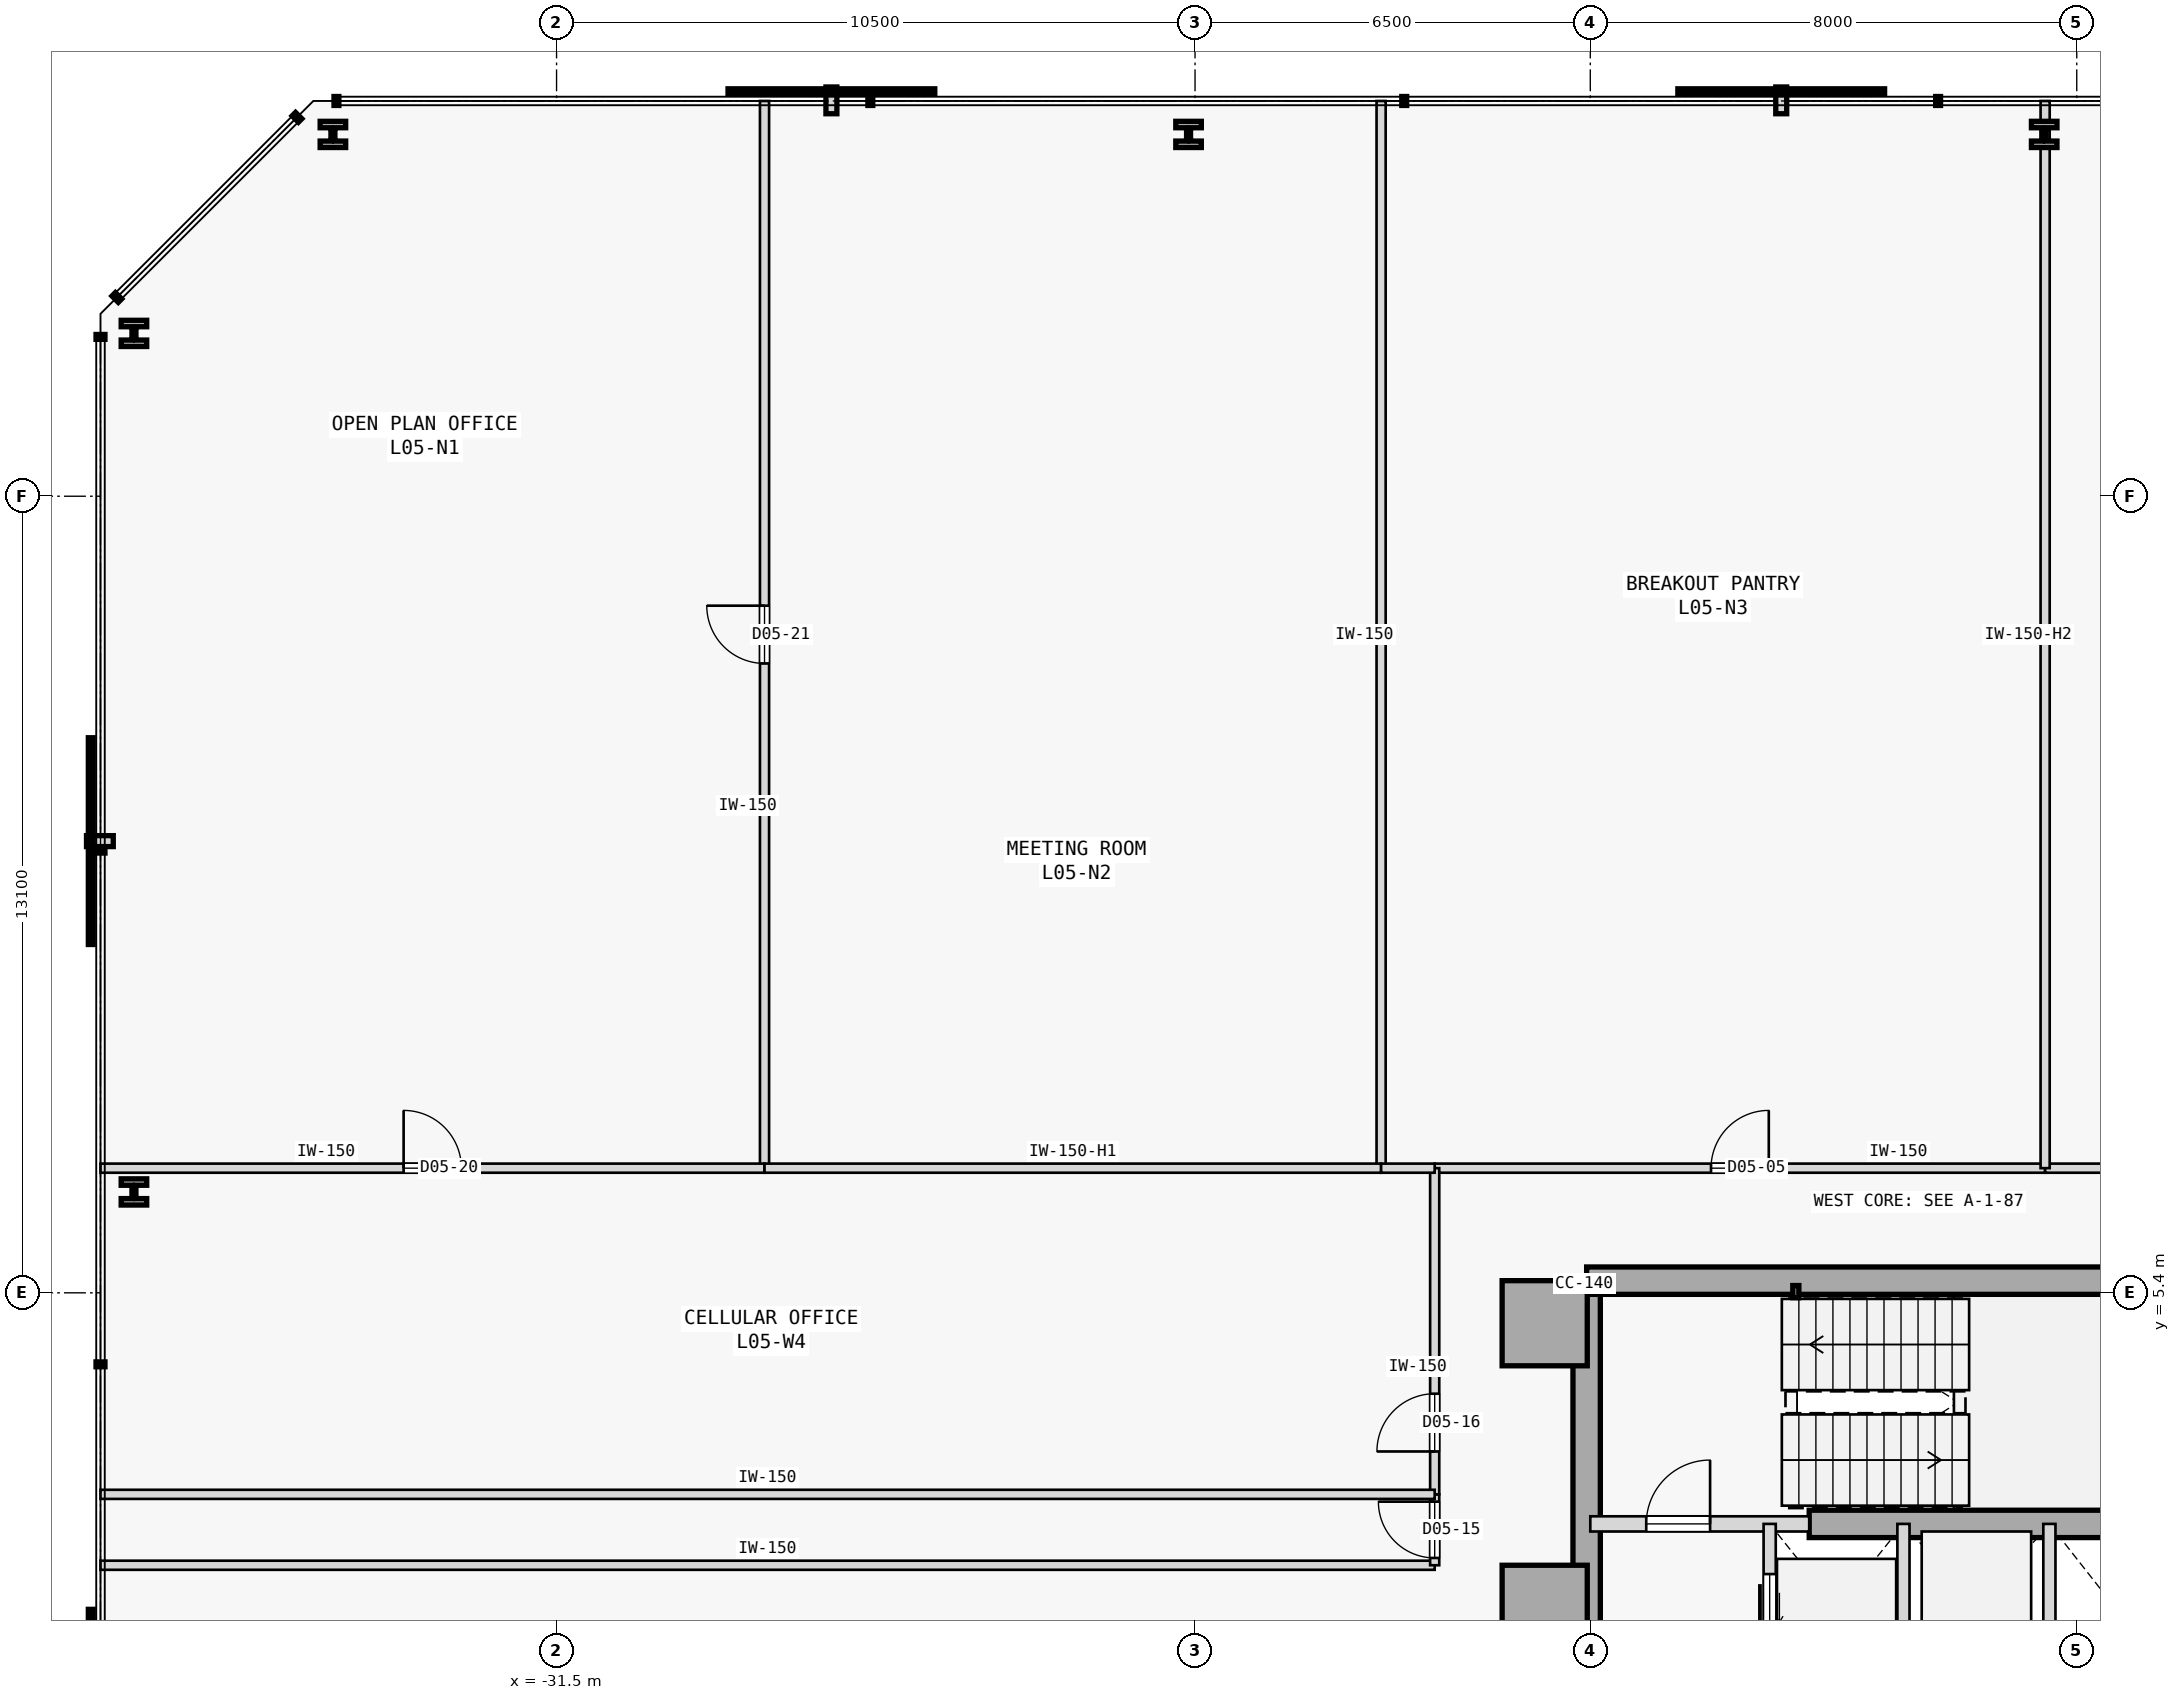
"""IFC4 building model, lengths in metres.
Left out: names, types, materials, properties, quantities, classifications, styles, units other than length and angle.
Written with IfcOpenShell. Run it as: python <this file> out.ifc"""

import sys

from ifc_helpers import new_model, si_unit, direction, frame, frame_2d, origin, origin_2d, place, context, subcontext, project, spatial, rectangle, hollow_rectangle, i_section, extrude, element, fill, save


model = new_model("IFC4")
c1 = context("Model", 3, precision=1e-05, world=origin(), true_north=direction((0.0, 1.0)))
c2 = subcontext(c1, "Body", "Model", "MODEL_VIEW")
j1 = project(units=[si_unit("LENGTHUNIT", "METRE"), si_unit("PLANEANGLEUNIT", "RADIAN")], contexts=[c1])
p1 = place(None, origin())
s1 = spatial("IfcSite", under=j1, at=p1, CompositionType="ELEMENT")
p2 = place(p1, origin())
s2 = spatial("IfcBuilding", under=s1, at=p2, CompositionType="ELEMENT")
p3 = place(p2, frame((0.0, 0.0, 25.6)))
s3 = spatial("IfcBuildingStorey", under=s2, at=p3, CompositionType="ELEMENT", Elevation=25.6)
for number, where, z_axis, x_axis in (
    (1, (-15.25, 4.9, 0.0), (0.0, 0.0, 1.0), (1.0, 0.0, 0.0)),
    (2, (-15.25, 0.22, 0.0), (0.0, 0.0, 1.0), (1.0, 0.0, 0.0)),
):
    element("IfcColumn", number, at=place(p3, frame(where, z_axis=z_axis, x_axis=x_axis)), inside=s3, PredefinedType="COLUMN", context=c2, shape_type="SweptSolid", body=[
        extrude(rectangle(XDim=1.4, YDim=1.4, at=origin_2d()), origin(), (0.0, 0.0, 1.0), 3.8),
    ])
p4 = place(p3, frame((-14.56, 5.6, 0.0), z_axis=(0.0, 0.0, 1.0), x_axis=(1.0, 0.0, 0.0)))
e3 = element("IfcWall", 3, at=p4, inside=s3, PredefinedType="SHEAR", context=c2, shape_type="SweptSolid", body=[
    extrude(rectangle(XDim=11.41, YDim=0.45, at=frame_2d((5.705, 0.0))), origin(), (0.0, 0.0, 1.0), 3.575),
])
p5 = place(p3, frame((-14.56, -5.375, 0.0), z_axis=(0.0, 0.0, 1.0), x_axis=(0.0, 1.0, 0.0)))
e4 = element("IfcWall", 4, at=p5, inside=s3, PredefinedType="SHEAR", context=c2, shape_type="SweptSolid", body=[
    extrude(rectangle(XDim=10.75, YDim=0.45, at=frame_2d((5.375, 0.0))), origin(), (0.0, 0.0, 1.0), 3.575),
])
p6 = place(p3, frame((-10.9, 1.6, 0.0), z_axis=(0.0, 0.0, 1.0), x_axis=(1.0, 0.0, 0.0)))
e5 = element("IfcWall", 5, at=p6, inside=s3, PredefinedType="SHEAR", context=c2, shape_type="SweptSolid", body=[
    extrude(rectangle(XDim=5.15, YDim=0.45, at=frame_2d((2.575, 0.0))), origin(), (0.0, 0.0, 1.0), 3.575),
])
p7 = place(p3, frame((-11.12, 5.42, 0.0), z_axis=(0.0, 0.0, 1.0), x_axis=(1.0, 0.0, 0.0)))
e6 = element("IfcColumn", 6, at=p7, inside=s3, PredefinedType="COLUMN", context=c2, shape_type="SweptSolid", body=[
    extrude(hollow_rectangle(XDim=0.1, YDim=0.2, WallThickness=0.008, at=origin_2d()), origin(), (0.0, 0.0, 1.0), 3.8),
])
for number, where, z_axis, x_axis in (
    (7, (-7.036, 24.45, 0.0), (0.0, 0.0, 1.0), (1.0, 0.0, 0.0)),
    (8, (-21.107, 24.45, 0.0), (0.0, 0.0, 1.0), (1.0, 0.0, 0.0)),
    (9, (-35.178, 24.45, 0.0), (0.0, 0.0, 1.0), (1.0, 0.0, 0.0)),
    (10, (-38.45, 21.178, 0.0), (0.0, 0.0, 1.0), (1.0, 0.0, 0.0)),
    (11, (-38.45, 7.059, 0.0), (0.0, 0.0, 1.0), (1.0, 0.0, 0.0)),
):
    element("IfcColumn", number, at=place(p3, frame(where, z_axis=z_axis, x_axis=x_axis)), inside=s3, PredefinedType="COLUMN", context=c2, shape_type="SweptSolid", body=[
        extrude(i_section(OverallWidth=0.42, OverallDepth=0.431, WebThickness=0.065, FlangeThickness=0.106, FilletRadius=0.015, at=origin_2d()), origin(), (0.0, 0.0, 1.0), 3.8),
    ])
p8 = place(p3, frame((-14.5, 1.6, 0.0), z_axis=(0.0, 0.0, 1.0), x_axis=(1.0, 0.0, 0.0)))
e12 = element("IfcWall", 12, at=p8, inside=s3, PredefinedType="STANDARD", context=c2, shape_type="SweptSolid", body=[
    extrude(rectangle(XDim=3.6, YDim=0.25, at=frame_2d((1.8, 0.0))), origin(), (0.0, 0.0, 1.0), 3.575),
])
p9 = place(p8, frame((0.92, 0.0, 0.0)))
e13 = element("IfcOpeningElement", 13, at=p9, cuts=e12, PredefinedType="OPENING", context=c2, shape_type="SweptSolid", body=[
    extrude(rectangle(XDim=1.05, YDim=2.15, at=frame_2d((0.525, 1.075))), frame((0.0, 0.135, 0.0), z_axis=(0.0, -1.0, 0.0), x_axis=(1.0, 0.0, 0.0)), (0.0, 0.0, 1.0), 0.27),
])
p10 = place(p3, frame((-11.55, -1.15, 0.0), z_axis=(0.0, 0.0, 1.0), x_axis=(0.0, 1.0, 0.0)))
e14 = element("IfcWall", 14, at=p10, inside=s3, PredefinedType="STANDARD", context=c2, shape_type="SweptSolid", body=[
    extrude(rectangle(XDim=2.75, YDim=0.2, at=frame_2d((1.375, 0.0))), origin(), (0.0, 0.0, 1.0), 3.575),
])
p11 = place(p10, frame((0.825, 0.0, 0.0)))
e15 = element("IfcOpeningElement", 15, at=p11, cuts=e14, PredefinedType="OPENING", context=c2, shape_type="SweptSolid", body=[
    extrude(rectangle(XDim=1.1, YDim=2.15, at=frame_2d((0.55, 1.075))), frame((0.0, 0.11, 0.0), z_axis=(0.0, -1.0, 0.0), x_axis=(1.0, 0.0, 0.0)), (0.0, 0.0, 1.0), 0.22),
])
for number, where, z_axis, x_axis in (
    (16, (-9.35, -1.15, 0.0), (0.0, 0.0, 1.0), (0.0, 1.0, 0.0)),
    (17, (-6.95, -1.15, 0.0), (0.0, 0.0, 1.0), (0.0, 1.0, 0.0)),
):
    element("IfcWall", number, at=place(p3, frame(where, z_axis=z_axis, x_axis=x_axis)), inside=s3, PredefinedType="STANDARD", context=c2, shape_type="SweptSolid", body=[
        extrude(rectangle(XDim=2.75, YDim=0.2, at=frame_2d((1.375, 0.0))), origin(), (0.0, 0.0, 1.0), 3.575),
    ])
p12 = place(p3, frame((-17.059, 7.45, 0.0), z_axis=(0.0, 0.0, 1.0), x_axis=(1.0, 0.0, 0.0)))
e18 = element("IfcWall", 18, at=p12, inside=s3, PredefinedType="PARTITIONING", context=c2, shape_type="SweptSolid", body=[
    extrude(rectangle(XDim=10.039, YDim=0.15, at=frame_2d((5.02, 0.0))), origin(), (0.0, 0.0, 1.0), 3.575),
])
p13 = place(p12, frame((4.544, 0.0, 0.0)))
e19 = element("IfcOpeningElement", 19, at=p13, cuts=e18, PredefinedType="OPENING", context=c2, shape_type="SweptSolid", body=[
    extrude(rectangle(XDim=0.95, YDim=2.15, at=frame_2d((0.475, 1.075))), frame((0.0, 0.085, 0.0), z_axis=(0.0, -1.0, 0.0), x_axis=(1.0, 0.0, 0.0)), (0.0, 0.0, 1.0), 0.17),
])
p14 = place(p3, frame((-7.02, 7.45, 0.0), z_axis=(0.0, 0.0, 1.0), x_axis=(1.0, 0.0, 0.0)))
e20 = element("IfcWall", 20, at=p14, inside=s3, PredefinedType="PARTITIONING", context=c2, shape_type="SweptSolid", body=[
    extrude(rectangle(XDim=6.1, YDim=0.15, at=frame_2d((3.05, 0.0))), origin(), (0.0, 0.0, 1.0), 3.575),
])
p15 = place(p3, frame((-39.0, 0.92, 0.0), z_axis=(0.0, 0.0, 1.0), x_axis=(1.0, 0.0, 0.0)))
e21 = element("IfcWall", 21, at=p15, inside=s3, PredefinedType="PARTITIONING", context=c2, shape_type="SweptSolid", body=[
    extrude(rectangle(XDim=21.941, YDim=0.15, at=frame_2d((10.97, 0.0))), origin(), (0.0, 0.0, 1.0), 3.575),
])
p16 = place(p3, frame((-17.059, 0.92, 0.0), z_axis=(0.0, 0.0, 1.0), x_axis=(0.0, 1.0, 0.0)))
e22 = element("IfcWall", 22, at=p16, inside=s3, PredefinedType="PARTITIONING", context=c2, shape_type="SweptSolid", body=[
    extrude(rectangle(XDim=1.166, YDim=0.15, at=frame_2d((0.583, 0.0))), origin(), (0.0, 0.0, 1.0), 3.575),
])
p17 = place(p16, frame((0.12, 0.0, 0.0)))
e23 = element("IfcOpeningElement", 23, at=p17, cuts=e22, PredefinedType="OPENING", context=c2, shape_type="SweptSolid", body=[
    extrude(rectangle(XDim=0.926, YDim=2.15, at=frame_2d((0.463, 1.075))), frame((0.0, 0.085, 0.0), z_axis=(0.0, -1.0, 0.0), x_axis=(1.0, 0.0, 0.0)), (0.0, 0.0, 1.0), 0.17),
])
p18 = place(p3, frame((-17.059, 2.086, 0.0), z_axis=(0.0, 0.0, 1.0), x_axis=(0.0, 1.0, 0.0)))
e24 = element("IfcWall", 24, at=p18, inside=s3, PredefinedType="PARTITIONING", context=c2, shape_type="SweptSolid", body=[
    extrude(rectangle(XDim=5.364, YDim=0.15, at=frame_2d((2.682, 0.0))), origin(), (0.0, 0.0, 1.0), 3.575),
])
p19 = place(p18, frame((0.705, 0.0, 0.0)))
e25 = element("IfcOpeningElement", 25, at=p19, cuts=e24, PredefinedType="OPENING", context=c2, shape_type="SweptSolid", body=[
    extrude(rectangle(XDim=0.95, YDim=2.15, at=frame_2d((0.475, 1.075))), frame((0.0, 0.085, 0.0), z_axis=(0.0, -1.0, 0.0), x_axis=(1.0, 0.0, 0.0)), (0.0, 0.0, 1.0), 0.17),
])
p20 = place(p3, frame((-28.08, 7.45, 0.0), z_axis=(0.0, 0.0, 1.0), x_axis=(0.0, 1.0, 0.0)))
e26 = element("IfcWall", 26, at=p20, inside=s3, PredefinedType="PARTITIONING", context=c2, shape_type="SweptSolid", body=[
    extrude(rectangle(XDim=17.55, YDim=0.15, at=frame_2d((8.775, 0.0))), origin(), (0.0, 0.0, 1.0), 3.575),
])
p21 = place(p20, frame((8.3, 0.0, 0.0)))
e27 = element("IfcOpeningElement", 27, at=p21, cuts=e26, PredefinedType="OPENING", context=c2, shape_type="SweptSolid", body=[
    extrude(rectangle(XDim=0.95, YDim=2.15, at=frame_2d((0.475, 1.075))), frame((0.0, 0.085, 0.0), z_axis=(0.0, -1.0, 0.0), x_axis=(1.0, 0.0, 0.0)), (0.0, 0.0, 1.0), 0.17),
])
p22 = place(p3, frame((-39.0, 7.45, 0.0), z_axis=(0.0, 0.0, 1.0), x_axis=(1.0, 0.0, 0.0)))
e28 = element("IfcWall", 28, at=p22, inside=s3, PredefinedType="PARTITIONING", context=c2, shape_type="SweptSolid", body=[
    extrude(rectangle(XDim=10.92, YDim=0.15, at=frame_2d((5.46, 0.0))), origin(), (0.0, 0.0, 1.0), 3.575),
])
p23 = place(p22, frame((4.985, 0.0, 0.0)))
e29 = element("IfcOpeningElement", 29, at=p23, cuts=e28, PredefinedType="OPENING", context=c2, shape_type="SweptSolid", body=[
    extrude(rectangle(XDim=0.95, YDim=2.15, at=frame_2d((0.475, 1.075))), frame((0.0, 0.085, 0.0), z_axis=(0.0, -1.0, 0.0), x_axis=(1.0, 0.0, 0.0)), (0.0, 0.0, 1.0), 0.17),
])
p24 = place(p3, frame((-17.94, 7.45, 0.0), z_axis=(0.0, 0.0, 1.0), x_axis=(0.0, 1.0, 0.0)))
e30 = element("IfcWall", 30, at=p24, inside=s3, PredefinedType="PARTITIONING", context=c2, shape_type="SweptSolid", body=[
    extrude(rectangle(XDim=17.55, YDim=0.15, at=frame_2d((8.775, 0.0))), origin(), (0.0, 0.0, 1.0), 3.575),
])
p25 = place(p3, frame((-28.08, 7.45, 0.0), z_axis=(0.0, 0.0, 1.0), x_axis=(1.0, 0.0, 0.0)))
e31 = element("IfcWall", 31, at=p25, inside=s3, PredefinedType="PARTITIONING", context=c2, shape_type="SweptSolid", body=[
    extrude(rectangle(XDim=10.14, YDim=0.15, at=frame_2d((5.07, 0.0))), origin(), (0.0, 0.0, 1.0), 3.125),
])
p26 = place(p3, frame((-7.02, 7.45, 0.0), z_axis=(0.0, 0.0, 1.0), x_axis=(0.0, 1.0, 0.0)))
e32 = element("IfcWall", 32, at=p26, inside=s3, PredefinedType="PARTITIONING", context=c2, shape_type="SweptSolid", body=[
    extrude(rectangle(XDim=17.55, YDim=0.15, at=frame_2d((8.775, 0.0))), origin(), (0.0, 0.0, 1.0), 2.975),
])
p27 = place(p3, frame((-17.94, 7.45, 0.0), z_axis=(0.0, 0.0, 1.0), x_axis=(1.0, 0.0, 0.0)))
e33 = element("IfcWall", 33, at=p27, inside=s3, PredefinedType="PARTITIONING", context=c2, shape_type="SweptSolid", body=[
    extrude(rectangle(XDim=0.881, YDim=0.15, at=frame_2d((0.44, 0.0))), origin(), (0.0, 0.0, 1.0), 3.575),
])
p28 = place(p3, frame((-39.0, 2.086, 0.0), z_axis=(0.0, 0.0, 1.0), x_axis=(1.0, 0.0, 0.0)))
e34 = element("IfcWall", 34, at=p28, inside=s3, PredefinedType="PARTITIONING", context=c2, shape_type="SweptSolid", body=[
    extrude(rectangle(XDim=21.941, YDim=0.15, at=frame_2d((10.97, 0.0))), origin(), (0.0, 0.0, 1.0), 3.575),
])
p29 = place(p9, origin())
e35 = element("IfcDoor", 35, at=p29, inside=s3, OperationType="SINGLE_SWING_RIGHT", PredefinedType="DOOR", context=c2, shape_type="SweptSolid", body=[
    extrude(rectangle(XDim=1.05, YDim=2.15, at=frame_2d((0.525, 1.075))), frame((0.0, 0.025, 0.0), z_axis=(0.0, -1.0, 0.0), x_axis=(1.0, 0.0, 0.0)), (0.0, 0.0, 1.0), 0.05),
])
fill(e13, e35)
p30 = place(p11, origin())
e36 = element("IfcDoor", 36, at=p30, inside=s3, OperationType="SLIDING_TO_RIGHT", PredefinedType="DOOR", context=c2, shape_type="SweptSolid", body=[
    extrude(rectangle(XDim=1.1, YDim=2.15, at=frame_2d((0.55, 1.075))), frame((0.0, 0.025, 0.0), z_axis=(0.0, -1.0, 0.0), x_axis=(1.0, 0.0, 0.0)), (0.0, 0.0, 1.0), 0.05),
])
fill(e15, e36)
p31 = place(p13, origin())
e37 = element("IfcDoor", 37, at=p31, inside=s3, OperationType="SINGLE_SWING_RIGHT", PredefinedType="DOOR", context=c2, shape_type="SweptSolid", body=[
    extrude(rectangle(XDim=0.95, YDim=2.15, at=frame_2d((0.475, 1.075))), frame((0.0, 0.025, 0.0), z_axis=(0.0, -1.0, 0.0), x_axis=(1.0, 0.0, 0.0)), (0.0, 0.0, 1.0), 0.05),
])
fill(e19, e37)
p32 = place(p17, origin())
e38 = element("IfcDoor", 38, at=p32, inside=s3, OperationType="SINGLE_SWING_RIGHT", PredefinedType="DOOR", context=c2, shape_type="SweptSolid", body=[
    extrude(rectangle(XDim=0.926, YDim=2.15, at=frame_2d((0.463, 1.075))), frame((0.0, 0.025, 0.0), z_axis=(0.0, -1.0, 0.0), x_axis=(1.0, 0.0, 0.0)), (0.0, 0.0, 1.0), 0.05),
])
fill(e23, e38)
p33 = place(p19, origin())
e39 = element("IfcDoor", 39, at=p33, inside=s3, OperationType="SINGLE_SWING_LEFT", PredefinedType="DOOR", context=c2, shape_type="SweptSolid", body=[
    extrude(rectangle(XDim=0.95, YDim=2.15, at=frame_2d((0.475, 1.075))), frame((0.0, 0.025, 0.0), z_axis=(0.0, -1.0, 0.0), x_axis=(1.0, 0.0, 0.0)), (0.0, 0.0, 1.0), 0.05),
])
fill(e25, e39)
p34 = place(p23, origin())
e40 = element("IfcDoor", 40, at=p34, inside=s3, OperationType="SINGLE_SWING_LEFT", PredefinedType="DOOR", context=c2, shape_type="SweptSolid", body=[
    extrude(rectangle(XDim=0.95, YDim=2.15, at=frame_2d((0.475, 1.075))), frame((0.0, 0.025, 0.0), z_axis=(0.0, -1.0, 0.0), x_axis=(1.0, 0.0, 0.0)), (0.0, 0.0, 1.0), 0.05),
])
fill(e29, e40)
p35 = place(p21, origin())
e41 = element("IfcDoor", 41, at=p35, inside=s3, OperationType="SINGLE_SWING_RIGHT", PredefinedType="DOOR", context=c2, shape_type="SweptSolid", body=[
    extrude(rectangle(XDim=0.95, YDim=2.15, at=frame_2d((0.475, 1.075))), frame((0.0, 0.025, 0.0), z_axis=(0.0, -1.0, 0.0), x_axis=(1.0, 0.0, 0.0)), (0.0, 0.0, 1.0), 0.05),
])
fill(e27, e41)
save(model, sys.argv[1])
